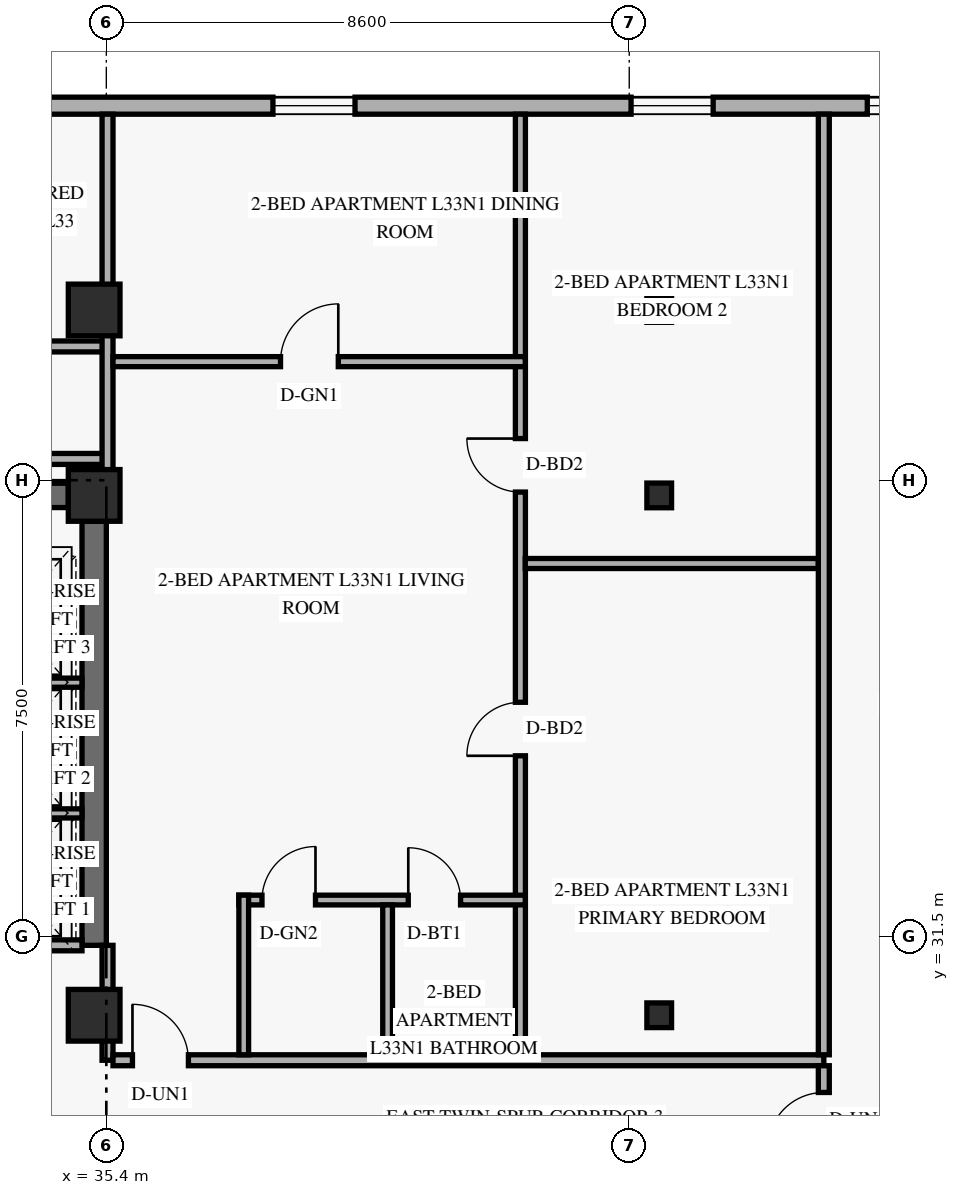
"""IFC4 building model, lengths in metres.
Left out: names, types, materials, properties, quantities, classifications, styles, units other than length and angle.
Written with IfcOpenShell. Run it as: python <this file> out.ifc"""

import sys

from ifc_helpers import new_model, si_unit, direction, frame, frame_2d, origin, origin_2d, place, context, subcontext, project, spatial, rectangle, hollow_rectangle, extrude, element, fill, save


model = new_model("IFC4")
c1 = context("Model", 3, precision=1e-05, world=origin(), true_north=direction((0.0, 1.0)))
c2 = subcontext(c1, "Body", "Model", "MODEL_VIEW")
j1 = project(units=[si_unit("LENGTHUNIT", "METRE"), si_unit("PLANEANGLEUNIT", "RADIAN")], contexts=[c1])
p1 = place(None, origin())
s1 = spatial("IfcSite", under=j1, at=p1, CompositionType="ELEMENT")
p2 = place(p1, origin())
s2 = spatial("IfcBuilding", under=s1, at=p2, CompositionType="ELEMENT")
p3 = place(p2, frame((0.0, 0.0, 128.4)))
s3 = spatial("IfcBuildingStorey", under=s2, at=p3, CompositionType="ELEMENT", Elevation=128.4)
p4 = place(p3, frame((35.2, 31.35, 0.0), z_axis=(0.0, 0.0, 1.0), x_axis=(0.0, 1.0, 0.0)))
e1 = element("IfcWall", 1, at=p4, inside=s3, PredefinedType="SHEAR", context=c2, shape_type="SweptSolid", body=[
    extrude(rectangle(XDim=6.975, YDim=0.4, at=frame_2d((3.487, 0.0))), origin(), (0.0, 0.0, 1.0), 2.749),
])
p5 = place(p3, frame((24.625, 38.75, 0.0), z_axis=(0.0, 0.0, 1.0), x_axis=(1.0, 0.0, 0.0)))
e2 = element("IfcWall", 2, at=p5, inside=s3, PredefinedType="SHEAR", context=c2, shape_type="SweptSolid", body=[
    extrude(rectangle(XDim=10.15, YDim=0.4, at=frame_2d((5.075, 0.0))), origin(), (0.0, 0.0, 1.0), 3.36),
])
p6 = place(p5, frame((5.2, 0.0, 0.0)))
e3 = element("IfcOpeningElement", 3, at=p6, cuts=e2, PredefinedType="OPENING", context=c2, shape_type="SweptSolid", body=[
    extrude(rectangle(XDim=1.05, YDim=2.15, at=frame_2d((0.525, 1.075))), frame((0.0, 0.21, 0.0), z_axis=(0.0, -1.0, 0.0), x_axis=(1.0, 0.0, 0.0)), (0.0, 0.0, 1.0), 0.42),
])
for number, where, z_axis, x_axis in (
    (4, (35.2, 30.2, 0.0), (0.0, 0.0, 1.0), (1.0, 0.0, 0.0)),
    (5, (35.2, 38.75, 0.0), (0.0, 0.0, 1.0), (1.0, 0.0, 0.0)),
    (6, (35.2, 41.8, 0.0), (0.0, 0.0, 1.0), (1.0, 0.0, 0.0)),
):
    element("IfcColumn", number, at=place(p3, frame(where, z_axis=z_axis, x_axis=x_axis)), inside=s3, PredefinedType="COLUMN", context=c2, shape_type="SweptSolid", body=[
        extrude(rectangle(XDim=0.85, YDim=0.85, at=origin_2d()), origin(), (0.0, 0.0, 1.0), 3.6),
    ])
for number, where, z_axis, x_axis in (
    (7, (44.43, 30.2, 0.0), (0.035, 0.0, 0.999), (0.0, 1.0, 0.0)),
    (8, (44.43, 38.75, 0.0), (0.035, 0.0, 0.999), (0.0, 1.0, 0.0)),
    (9, (44.43, 41.8, 0.0), (0.035, 0.0, 0.999), (0.0, 1.0, 0.0)),
):
    element("IfcColumn", number, at=place(p3, frame(where, z_axis=z_axis, x_axis=x_axis)), inside=s3, PredefinedType="COLUMN", context=c2, shape_type="SweptSolid", body=[
        extrude(hollow_rectangle(XDim=0.406, YDim=0.406, WallThickness=0.016, at=origin_2d()), origin(), (0.0, 0.0, 1.0), 3.602),
    ])
p7 = place(p3, frame((49.98, 45.16, 0.0), z_axis=(0.0, 0.0, 1.0), x_axis=(-1.0, 0.0, 0.0)))
e10 = element("IfcWall", 10, at=p7, inside=s3, PredefinedType="SOLIDWALL", context=c2, shape_type="SweptSolid", body=[
    extrude(rectangle(XDim=36.56, YDim=0.28, at=frame_2d((18.28, 0.0))), origin(), (0.0, 0.0, 1.0), 3.36),
])
p8 = place(p7, frame((31.77, 0.0, 0.85)))
e11 = element("IfcOpeningElement", 11, at=p8, cuts=e10, PredefinedType="OPENING", context=c2, shape_type="SweptSolid", body=[
    extrude(rectangle(XDim=1.35, YDim=1.55, at=frame_2d((0.675, 0.775))), frame((0.0, 0.15, 0.0), z_axis=(0.0, -1.0, 0.0), x_axis=(1.0, 0.0, 0.0)), (0.0, 0.0, 1.0), 0.3),
])
p9 = place(p7, frame((23.28, 0.0, 0.85)))
e12 = element("IfcOpeningElement", 12, at=p9, cuts=e10, PredefinedType="OPENING", context=c2, shape_type="SweptSolid", body=[
    extrude(rectangle(XDim=1.35, YDim=1.55, at=frame_2d((0.675, 0.775))), frame((0.0, 0.15, 0.0), z_axis=(0.0, -1.0, 0.0), x_axis=(1.0, 0.0, 0.0)), (0.0, 0.0, 1.0), 0.3),
])
p10 = place(p7, frame((16.395, 0.0, 0.85)))
e13 = element("IfcOpeningElement", 13, at=p10, cuts=e10, PredefinedType="OPENING", context=c2, shape_type="SweptSolid", body=[
    extrude(rectangle(XDim=1.35, YDim=1.55, at=frame_2d((0.675, 0.775))), frame((0.0, 0.15, 0.0), z_axis=(0.0, -1.0, 0.0), x_axis=(1.0, 0.0, 0.0)), (0.0, 0.0, 1.0), 0.3),
])
p11 = place(p7, frame((10.49, 0.0, 0.85)))
e14 = element("IfcOpeningElement", 14, at=p11, cuts=e10, PredefinedType="OPENING", context=c2, shape_type="SweptSolid", body=[
    extrude(rectangle(XDim=1.35, YDim=1.55, at=frame_2d((0.675, 0.775))), frame((0.0, 0.15, 0.0), z_axis=(0.0, -1.0, 0.0), x_axis=(1.0, 0.0, 0.0)), (0.0, 0.0, 1.0), 0.3),
])
p12 = place(p7, frame((4.6, 0.0, 0.85)))
e15 = element("IfcOpeningElement", 15, at=p12, cuts=e10, PredefinedType="OPENING", context=c2, shape_type="SweptSolid", body=[
    extrude(rectangle(XDim=1.35, YDim=1.55, at=frame_2d((0.675, 0.775))), frame((0.0, 0.15, 0.0), z_axis=(0.0, -1.0, 0.0), x_axis=(1.0, 0.0, 0.0)), (0.0, 0.0, 1.0), 0.3),
])
p13 = place(p7, frame((0.715, 0.0, 0.85)))
e16 = element("IfcOpeningElement", 16, at=p13, cuts=e10, PredefinedType="OPENING", context=c2, shape_type="SweptSolid", body=[
    extrude(rectangle(XDim=1.35, YDim=1.55, at=frame_2d((0.675, 0.775))), frame((0.0, 0.15, 0.0), z_axis=(0.0, -1.0, 0.0), x_axis=(1.0, 0.0, 0.0)), (0.0, 0.0, 1.0), 0.3),
])
p14 = place(p3, frame((32.74, 31.35, 0.0), z_axis=(0.0, 0.0, 1.0), x_axis=(1.0, 0.0, 0.0)))
e17 = element("IfcWall", 17, at=p14, inside=s3, PredefinedType="STANDARD", context=c2, shape_type="SweptSolid", body=[
    extrude(rectangle(XDim=2.26, YDim=0.18, at=frame_2d((1.13, 0.0))), origin(), (0.0, 0.0, 1.0), 3.36),
])
for number, where, z_axis, x_axis in (
    (18, (32.74, 33.52, 0.0), (0.0, 0.0, 1.0), (1.0, 0.0, 0.0)),
    (19, (32.74, 35.67, 0.0), (0.0, 0.0, 1.0), (1.0, 0.0, 0.0)),
):
    element("IfcWall", number, at=place(p3, frame(where, z_axis=z_axis, x_axis=x_axis)), inside=s3, PredefinedType="STANDARD", context=c2, shape_type="SweptSolid", body=[
        extrude(rectangle(XDim=2.26, YDim=0.15, at=frame_2d((1.13, 0.0))), origin(), (0.0, 0.0, 1.0), 3.36),
    ])
p15 = place(p3, frame((35.42, 29.46, 0.0), z_axis=(0.0, 0.0, 1.0), x_axis=(0.0, 1.0, 0.0)))
e20 = element("IfcWall", 20, at=p15, inside=s3, PredefinedType="STANDARD", context=c2, shape_type="SweptSolid", body=[
    extrude(rectangle(XDim=1.89, YDim=0.18, at=frame_2d((0.945, 0.0))), origin(), (0.0, 0.0, 1.0), 2.731),
])
p16 = place(p3, frame((35.51, 29.46, 0.0), z_axis=(0.0, 0.0, 1.0), x_axis=(1.0, 0.0, 0.0)))
e21 = element("IfcWall", 21, at=p16, inside=s3, PredefinedType="STANDARD", context=c2, shape_type="SweptSolid", body=[
    extrude(rectangle(XDim=11.69, YDim=0.18, at=frame_2d((5.845, 0.0))), origin(), (0.0, 0.0, 1.0), 2.731),
])
p17 = place(p16, frame((0.32, 0.0, 0.0)))
e22 = element("IfcOpeningElement", 22, at=p17, cuts=e21, PredefinedType="OPENING", context=c2, shape_type="SweptSolid", body=[
    extrude(rectangle(XDim=0.92, YDim=2.15, at=frame_2d((0.46, 1.075))), frame((0.0, 0.1, 0.0), z_axis=(0.0, -1.0, 0.0), x_axis=(1.0, 0.0, 0.0)), (0.0, 0.0, 1.0), 0.2),
])
p18 = place(p3, frame((21.74, 41.2, 0.0), z_axis=(0.0, 0.0, 1.0), x_axis=(1.0, 0.0, 0.0)))
e23 = element("IfcWall", 23, at=p18, inside=s3, PredefinedType="STANDARD", context=c2, shape_type="SweptSolid", body=[
    extrude(rectangle(XDim=13.68, YDim=0.18, at=frame_2d((6.84, 0.0))), origin(), (0.0, 0.0, 1.0), 2.731),
])
p19 = place(p18, frame((3.09, 0.0, 0.0)))
e24 = element("IfcOpeningElement", 24, at=p19, cuts=e23, PredefinedType="OPENING", context=c2, shape_type="SweptSolid", body=[
    extrude(rectangle(XDim=0.95, YDim=2.15, at=frame_2d((0.475, 1.075))), frame((0.0, 0.1, 0.0), z_axis=(0.0, -1.0, 0.0), x_axis=(1.0, 0.0, 0.0)), (0.0, 0.0, 1.0), 0.2),
])
p20 = place(p18, frame((10.11, 0.0, 0.0)))
e25 = element("IfcOpeningElement", 25, at=p20, cuts=e23, PredefinedType="OPENING", context=c2, shape_type="SweptSolid", body=[
    extrude(rectangle(XDim=0.95, YDim=2.15, at=frame_2d((0.475, 1.075))), frame((0.0, 0.1, 0.0), z_axis=(0.0, -1.0, 0.0), x_axis=(1.0, 0.0, 0.0)), (0.0, 0.0, 1.0), 0.2),
])
p21 = place(p3, frame((23.85, 39.35, 0.0), z_axis=(0.0, 0.0, 1.0), x_axis=(1.0, 0.0, 0.0)))
e26 = element("IfcWall", 26, at=p21, inside=s3, PredefinedType="STANDARD", context=c2, shape_type="SweptSolid", body=[
    extrude(rectangle(XDim=11.57, YDim=0.18, at=frame_2d((5.785, 0.0))), origin(), (0.0, 0.0, 1.0), 2.731),
])
p22 = place(p3, frame((35.42, 38.75, 0.0), z_axis=(0.0, 0.0, 1.0), x_axis=(0.0, 1.0, 0.0)))
e27 = element("IfcWall", 27, at=p22, inside=s3, PredefinedType="PARTITIONING", context=c2, shape_type="SweptSolid", body=[
    extrude(rectangle(XDim=6.27, YDim=0.18, at=frame_2d((3.135, 0.0))), origin(), (0.0, 0.0, 1.0), 2.731),
])
p23 = place(p3, frame((42.21, 29.55, 0.0), z_axis=(0.0, 0.0, 1.0), x_axis=(0.0, 1.0, 0.0)))
e28 = element("IfcWall", 28, at=p23, inside=s3, PredefinedType="PARTITIONING", context=c2, shape_type="SweptSolid", body=[
    extrude(rectangle(XDim=15.47, YDim=0.165, at=frame_2d((7.735, 0.0))), origin(), (0.0, 0.0, 1.0), 2.731),
])
p24 = place(p23, frame((4.917, 0.0, 0.0)))
e29 = element("IfcOpeningElement", 29, at=p24, cuts=e28, PredefinedType="OPENING", context=c2, shape_type="SweptSolid", body=[
    extrude(rectangle(XDim=0.88, YDim=2.14, at=frame_2d((0.44, 1.07))), frame((0.0, 0.093, 0.0), z_axis=(0.0, -1.0, 0.0), x_axis=(1.0, 0.0, 0.0)), (0.0, 0.0, 1.0), 0.185),
])
p25 = place(p23, frame((9.255, 0.0, 0.0)))
e30 = element("IfcOpeningElement", 30, at=p25, cuts=e28, PredefinedType="OPENING", context=c2, shape_type="SweptSolid", body=[
    extrude(rectangle(XDim=0.88, YDim=2.14, at=frame_2d((0.44, 1.07))), frame((0.0, 0.093, 0.0), z_axis=(0.0, -1.0, 0.0), x_axis=(1.0, 0.0, 0.0)), (0.0, 0.0, 1.0), 0.185),
])
p26 = place(p3, frame((37.58, 32.095, 0.0), z_axis=(0.0, 0.0, 1.0), x_axis=(1.0, 0.0, 0.0)))
e31 = element("IfcWall", 31, at=p26, inside=s3, PredefinedType="PLUMBINGWALL", context=c2, shape_type="SweptSolid", body=[
    extrude(rectangle(XDim=4.71, YDim=0.16, at=frame_2d((2.355, 0.0))), origin(), (0.0, 0.0, 1.0), 3.36),
])
p27 = place(p26, frame((0.38, 0.0, 0.0)))
e32 = element("IfcOpeningElement", 32, at=p27, cuts=e31, PredefinedType="OPENING", context=c2, shape_type="SweptSolid", body=[
    extrude(rectangle(XDim=0.88, YDim=2.12, at=frame_2d((0.44, 1.06))), frame((0.0, 0.09, 0.0), z_axis=(0.0, -1.0, 0.0), x_axis=(1.0, 0.0, 0.0)), (0.0, 0.0, 1.0), 0.18),
])
p28 = place(p26, frame((2.786, 0.0, 0.0)))
e33 = element("IfcOpeningElement", 33, at=p28, cuts=e31, PredefinedType="OPENING", context=c2, shape_type="SweptSolid", body=[
    extrude(rectangle(XDim=0.86, YDim=2.12, at=frame_2d((0.43, 1.06))), frame((0.0, 0.09, 0.0), z_axis=(0.0, -1.0, 0.0), x_axis=(1.0, 0.0, 0.0)), (0.0, 0.0, 1.0), 0.18),
])
p29 = place(p3, frame((37.66, 29.55, 0.0), z_axis=(0.0, 0.0, 1.0), x_axis=(0.0, 1.0, 0.0)))
e34 = element("IfcWall", 34, at=p29, inside=s3, PredefinedType="PLUMBINGWALL", context=c2, shape_type="SweptSolid", body=[
    extrude(rectangle(XDim=2.625, YDim=0.16, at=frame_2d((1.312, 0.0))), origin(), (0.0, 0.0, 1.0), 2.731),
])
p30 = place(p3, frame((40.026, 29.55, 0.0), z_axis=(0.0, 0.0, 1.0), x_axis=(0.0, 1.0, 0.0)))
e35 = element("IfcWall", 35, at=p30, inside=s3, PredefinedType="PLUMBINGWALL", context=c2, shape_type="SweptSolid", body=[
    extrude(rectangle(XDim=2.465, YDim=0.16, at=frame_2d((1.232, 0.0))), origin(), (0.0, 0.0, 1.0), 2.731),
])
p31 = place(p3, frame((35.51, 40.95, 0.0), z_axis=(0.0, 0.0, 1.0), x_axis=(1.0, 0.0, 0.0)))
e36 = element("IfcWall", 36, at=p31, inside=s3, PredefinedType="PARTITIONING", context=c2, shape_type="SweptSolid", body=[
    extrude(rectangle(XDim=6.78, YDim=0.165, at=frame_2d((3.39, 0.0))), origin(), (0.0, 0.0, 1.0), 3.36),
])
p32 = place(p31, frame((2.755, 0.0, 0.0)))
e37 = element("IfcOpeningElement", 37, at=p32, cuts=e36, PredefinedType="OPENING", context=c2, shape_type="SweptSolid", body=[
    extrude(rectangle(XDim=0.95, YDim=2.15, at=frame_2d((0.475, 1.075))), frame((0.0, 0.093, 0.0), z_axis=(0.0, -1.0, 0.0), x_axis=(1.0, 0.0, 0.0)), (0.0, 0.0, 1.0), 0.185),
])
p33 = place(p3, frame((42.29, 37.63, 0.0), z_axis=(0.0, 0.0, 1.0), x_axis=(1.0, 0.0, 0.0)))
e38 = element("IfcWall", 38, at=p33, inside=s3, PredefinedType="PARTITIONING", context=c2, shape_type="SweptSolid", body=[
    extrude(rectangle(XDim=4.82, YDim=0.165, at=frame_2d((2.41, 0.0))), origin(), (0.0, 0.0, 1.0), 2.731),
])
p34 = place(p3, frame((47.2, 27.65, 0.0), z_axis=(0.0, 0.0, 1.0), x_axis=(0.0, 1.0, 0.0)))
e39 = element("IfcWall", 39, at=p34, inside=s3, PredefinedType="STANDARD", context=c2, shape_type="SweptSolid", body=[
    extrude(rectangle(XDim=1.72, YDim=0.18, at=frame_2d((0.86, 0.0))), origin(), (0.0, 0.0, 1.0), 3.36),
])
p35 = place(p34, frame((0.36, 0.0, 0.0)))
e40 = element("IfcOpeningElement", 40, at=p35, cuts=e39, PredefinedType="OPENING", context=c2, shape_type="SweptSolid", body=[
    extrude(rectangle(XDim=0.92, YDim=2.15, at=frame_2d((0.46, 1.075))), frame((0.0, 0.1, 0.0), z_axis=(0.0, -1.0, 0.0), x_axis=(1.0, 0.0, 0.0)), (0.0, 0.0, 1.0), 0.2),
])
p36 = place(p3, frame((47.2, 29.55, 0.0), z_axis=(0.0, 0.0, 1.0), x_axis=(0.0, 1.0, 0.0)))
e41 = element("IfcWall", 41, at=p36, inside=s3, PredefinedType="PARTITIONING", context=c2, shape_type="SweptSolid", body=[
    extrude(rectangle(XDim=15.47, YDim=0.18, at=frame_2d((7.735, 0.0))), origin(), (0.0, 0.0, 1.0), 2.731),
])
p37 = place(p11, origin())
e42 = element("IfcWindow", 42, at=p37, inside=s3, PartitioningType="SINGLE_PANEL", PredefinedType="WINDOW", context=c2, shape_type="SweptSolid", body=[
    extrude(rectangle(XDim=1.35, YDim=1.55, at=frame_2d((0.675, 0.775))), frame((0.0, 0.03, 0.0), z_axis=(0.0, -1.0, 0.0), x_axis=(1.0, 0.0, 0.0)), (0.0, 0.0, 1.0), 0.06),
])
fill(e14, e42)
p38 = place(p12, origin())
e43 = element("IfcWindow", 43, at=p38, inside=s3, PartitioningType="SINGLE_PANEL", PredefinedType="WINDOW", context=c2, shape_type="SweptSolid", body=[
    extrude(rectangle(XDim=1.35, YDim=1.55, at=frame_2d((0.675, 0.775))), frame((0.0, 0.03, 0.0), z_axis=(0.0, -1.0, 0.0), x_axis=(1.0, 0.0, 0.0)), (0.0, 0.0, 1.0), 0.06),
])
fill(e15, e43)
p39 = place(p13, origin())
e44 = element("IfcWindow", 44, at=p39, inside=s3, PartitioningType="SINGLE_PANEL", PredefinedType="WINDOW", context=c2, shape_type="SweptSolid", body=[
    extrude(rectangle(XDim=1.35, YDim=1.55, at=frame_2d((0.675, 0.775))), frame((0.0, 0.03, 0.0), z_axis=(0.0, -1.0, 0.0), x_axis=(1.0, 0.0, 0.0)), (0.0, 0.0, 1.0), 0.06),
])
fill(e16, e44)
p40 = place(p32, origin())
e45 = element("IfcDoor", 45, at=p40, inside=s3, OperationType="SINGLE_SWING_RIGHT", PredefinedType="DOOR", context=c2, shape_type="SweptSolid", body=[
    extrude(rectangle(XDim=0.95, YDim=2.15, at=frame_2d((0.475, 1.075))), frame((0.0, 0.025, 0.0), z_axis=(0.0, -1.0, 0.0), x_axis=(1.0, 0.0, 0.0)), (0.0, 0.0, 1.0), 0.05),
])
fill(e37, e45)
p41 = place(p17, origin())
e46 = element("IfcDoor", 46, at=p41, inside=s3, OperationType="SINGLE_SWING_LEFT", PredefinedType="DOOR", context=c2, shape_type="SweptSolid", body=[
    extrude(rectangle(XDim=0.92, YDim=2.15, at=frame_2d((0.46, 1.075))), frame((0.0, 0.025, 0.0), z_axis=(0.0, -1.0, 0.0), x_axis=(1.0, 0.0, 0.0)), (0.0, 0.0, 1.0), 0.05),
])
fill(e22, e46)
p42 = place(p27, origin())
e47 = element("IfcDoor", 47, at=p42, inside=s3, OperationType="SINGLE_SWING_RIGHT", PredefinedType="DOOR", context=c2, shape_type="SweptSolid", body=[
    extrude(rectangle(XDim=0.88, YDim=2.12, at=frame_2d((0.44, 1.06))), frame((0.0, 0.025, 0.0), z_axis=(0.0, -1.0, 0.0), x_axis=(1.0, 0.0, 0.0)), (0.0, 0.0, 1.0), 0.05),
])
fill(e32, e47)
p43 = place(p28, origin())
e48 = element("IfcDoor", 48, at=p43, inside=s3, OperationType="SINGLE_SWING_LEFT", PredefinedType="DOOR", context=c2, shape_type="SweptSolid", body=[
    extrude(rectangle(XDim=0.86, YDim=2.12, at=frame_2d((0.43, 1.06))), frame((0.0, 0.025, 0.0), z_axis=(0.0, -1.0, 0.0), x_axis=(1.0, 0.0, 0.0)), (0.0, 0.0, 1.0), 0.05),
])
fill(e33, e48)
p44 = place(p24, origin())
e49 = element("IfcDoor", 49, at=p44, inside=s3, OperationType="SINGLE_SWING_LEFT", PredefinedType="DOOR", context=c2, shape_type="SweptSolid", body=[
    extrude(rectangle(XDim=0.88, YDim=2.14, at=frame_2d((0.44, 1.07))), frame((0.0, 0.025, 0.0), z_axis=(0.0, -1.0, 0.0), x_axis=(1.0, 0.0, 0.0)), (0.0, 0.0, 1.0), 0.05),
])
fill(e29, e49)
p45 = place(p25, origin())
e50 = element("IfcDoor", 50, at=p45, inside=s3, OperationType="SINGLE_SWING_RIGHT", PredefinedType="DOOR", context=c2, shape_type="SweptSolid", body=[
    extrude(rectangle(XDim=0.88, YDim=2.14, at=frame_2d((0.44, 1.07))), frame((0.0, 0.025, 0.0), z_axis=(0.0, -1.0, 0.0), x_axis=(1.0, 0.0, 0.0)), (0.0, 0.0, 1.0), 0.05),
])
fill(e30, e50)
p46 = place(p35, origin())
e51 = element("IfcDoor", 51, at=p46, inside=s3, OperationType="SINGLE_SWING_LEFT", PredefinedType="DOOR", context=c2, shape_type="SweptSolid", body=[
    extrude(rectangle(XDim=0.92, YDim=2.15, at=frame_2d((0.46, 1.075))), frame((0.0, 0.025, 0.0), z_axis=(0.0, -1.0, 0.0), x_axis=(1.0, 0.0, 0.0)), (0.0, 0.0, 1.0), 0.05),
])
fill(e40, e51)
save(model, sys.argv[1])
